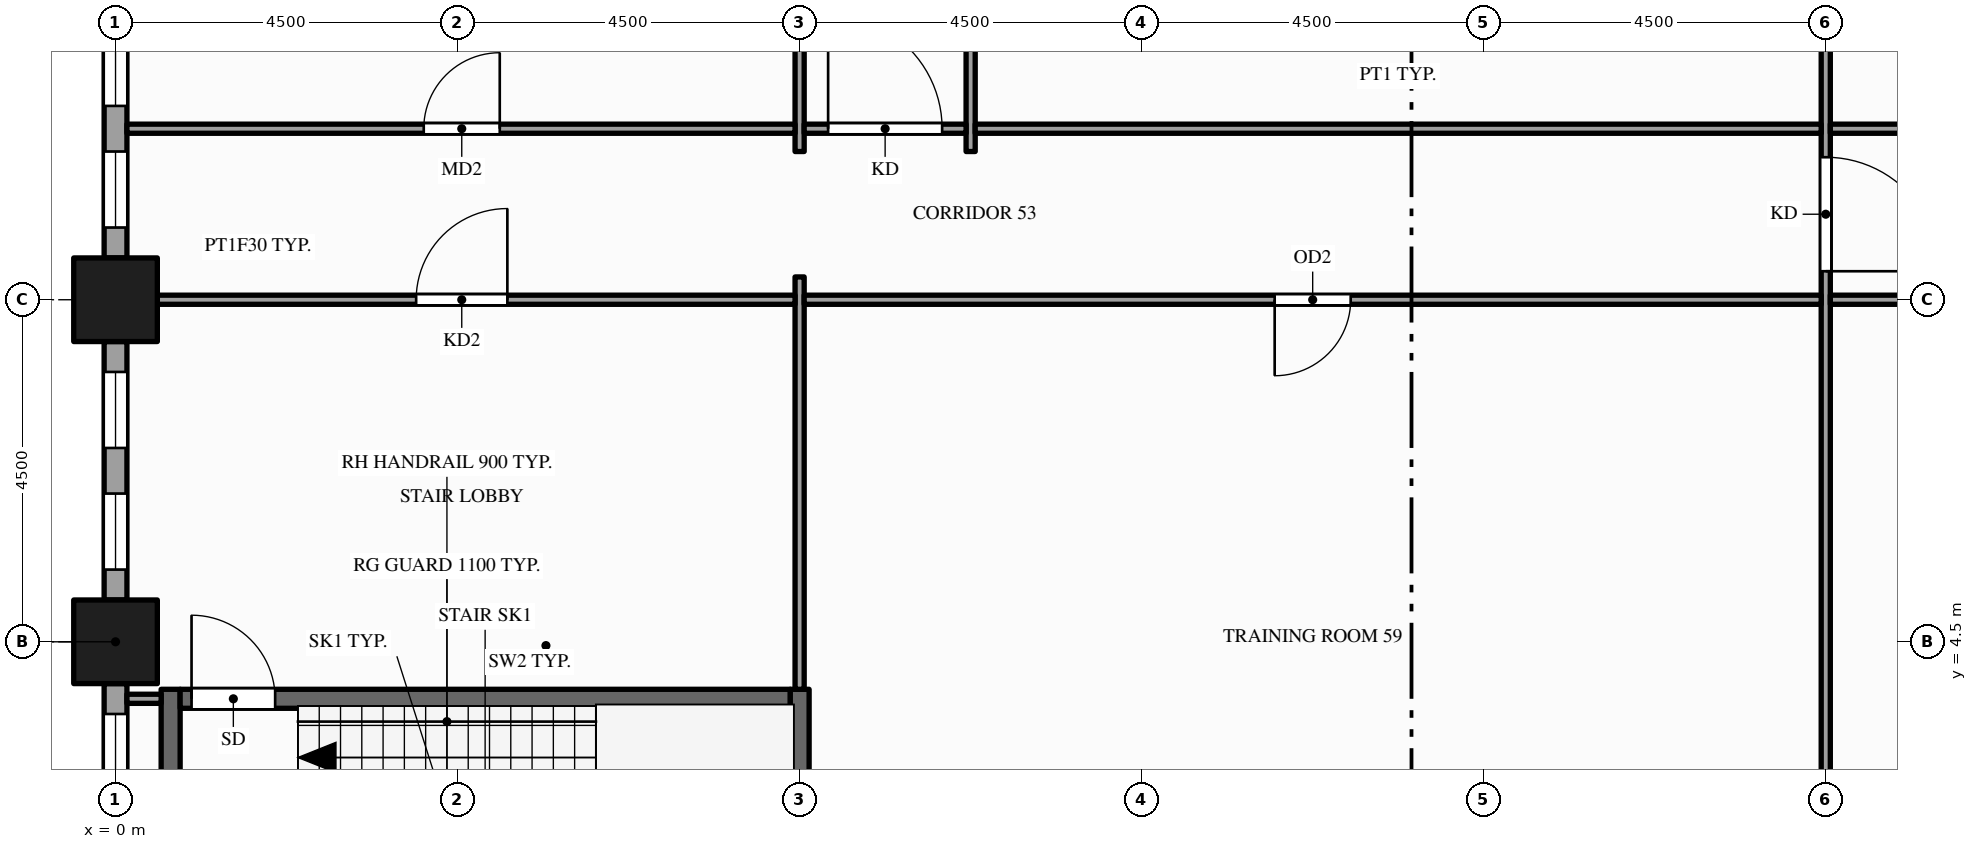
"""IFC4 building model, lengths in metres.
Left out: names, types, materials, properties, quantities, classifications, styles, units other than length and angle.
Written with IfcOpenShell. Run it as: python <this file> out.ifc"""

import sys

from ifc_helpers import new_model, si_unit, direction, frame, frame_2d, origin, origin_2d, place, context, subcontext, project, spatial, rectangle, hollow_rectangle, extrude, element, fill, save


model = new_model("IFC4")
c1 = context("Model", 3, precision=1e-05, world=origin(), true_north=direction((0.0, 1.0)))
c2 = subcontext(c1, "Body", "Model", "MODEL_VIEW")
j1 = project(units=[si_unit("LENGTHUNIT", "METRE"), si_unit("PLANEANGLEUNIT", "RADIAN")], contexts=[c1])
p1 = place(None, origin())
s1 = spatial("IfcSite", under=j1, at=p1, CompositionType="ELEMENT")
p2 = place(p1, origin())
s2 = spatial("IfcBuilding", under=s1, at=p2, CompositionType="ELEMENT")
p3 = place(p2, frame((0.0, 0.0, 14.0)))
s3 = spatial("IfcBuildingStorey", under=s2, at=p3, CompositionType="ELEMENT", Elevation=14.0)
for number, where, z_axis, x_axis in (
    (1, (0.0, 4.5, -0.25), (0.0, 0.0, 1.0), (1.0, 0.0, 0.0)),
    (2, (0.0, 9.0, -0.25), (0.0, 0.0, 1.0), (1.0, 0.0, 0.0)),
):
    element("IfcColumn", number, at=place(p3, frame(where, z_axis=z_axis, x_axis=x_axis)), inside=s3, PredefinedType="COLUMN", context=c2, shape_type="SweptSolid", body=[
        extrude(hollow_rectangle(XDim=1.1, YDim=1.1, WallThickness=0.06, at=origin_2d()), origin(), (0.0, 0.0, 1.0), 5.0),
    ])
p4 = place(p3, frame((0.0, 12.95, 0.0), z_axis=(0.0, 0.0, 1.0), x_axis=(0.0, -1.0, 0.0)))
e3 = element("IfcWall", 3, at=p4, inside=s3, PredefinedType="STANDARD", context=c2, shape_type="SweptSolid", body=[
    extrude(rectangle(XDim=3.4, YDim=0.3, at=frame_2d((1.7, 0.0))), origin(), (0.0, 0.0, 1.0), 4.036),
])
p5 = place(p4, frame((0.4, 0.0, 0.9)))
e4 = element("IfcOpeningElement", 4, at=p5, cuts=e3, PredefinedType="OPENING", context=c2, shape_type="SweptSolid", body=[
    extrude(rectangle(XDim=1.0, YDim=2.75, at=frame_2d((0.5, 1.375))), frame((0.0, 0.16, 0.0), z_axis=(0.0, -1.0, 0.0), x_axis=(1.0, 0.0, 0.0)), (0.0, 0.0, 1.0), 0.32),
])
p6 = place(p4, frame((2.0, 0.0, 0.9)))
e5 = element("IfcOpeningElement", 5, at=p6, cuts=e3, PredefinedType="OPENING", context=c2, shape_type="SweptSolid", body=[
    extrude(rectangle(XDim=1.0, YDim=2.75, at=frame_2d((0.5, 1.375))), frame((0.0, 0.16, 0.0), z_axis=(0.0, -1.0, 0.0), x_axis=(1.0, 0.0, 0.0)), (0.0, 0.0, 1.0), 0.32),
])
p7 = place(p3, frame((0.0, 8.45, 0.0), z_axis=(0.0, 0.0, 1.0), x_axis=(0.0, -1.0, 0.0)))
e6 = element("IfcWall", 6, at=p7, inside=s3, PredefinedType="STANDARD", context=c2, shape_type="SweptSolid", body=[
    extrude(rectangle(XDim=3.4, YDim=0.3, at=frame_2d((1.7, 0.0))), origin(), (0.0, 0.0, 1.0), 4.036),
])
p8 = place(p7, frame((0.4, 0.0, 0.9)))
e7 = element("IfcOpeningElement", 7, at=p8, cuts=e6, PredefinedType="OPENING", context=c2, shape_type="SweptSolid", body=[
    extrude(rectangle(XDim=1.0, YDim=2.75, at=frame_2d((0.5, 1.375))), frame((0.0, 0.16, 0.0), z_axis=(0.0, -1.0, 0.0), x_axis=(1.0, 0.0, 0.0)), (0.0, 0.0, 1.0), 0.32),
])
p9 = place(p7, frame((2.0, 0.0, 0.9)))
e8 = element("IfcOpeningElement", 8, at=p9, cuts=e6, PredefinedType="OPENING", context=c2, shape_type="SweptSolid", body=[
    extrude(rectangle(XDim=1.0, YDim=2.75, at=frame_2d((0.5, 1.375))), frame((0.0, 0.16, 0.0), z_axis=(0.0, -1.0, 0.0), x_axis=(1.0, 0.0, 0.0)), (0.0, 0.0, 1.0), 0.32),
])
p10 = place(p3, frame((0.0, 3.95, 0.0), z_axis=(0.0, 0.0, 1.0), x_axis=(0.0, -1.0, 0.0)))
e9 = element("IfcWall", 9, at=p10, inside=s3, PredefinedType="STANDARD", context=c2, shape_type="SweptSolid", body=[
    extrude(rectangle(XDim=3.4, YDim=0.3, at=frame_2d((1.7, 0.0))), origin(), (0.0, 0.0, 1.0), 4.036),
])
p11 = place(p10, frame((0.4, 0.0, 0.9)))
e10 = element("IfcOpeningElement", 10, at=p11, cuts=e9, PredefinedType="OPENING", context=c2, shape_type="SweptSolid", body=[
    extrude(rectangle(XDim=1.0, YDim=2.75, at=frame_2d((0.5, 1.375))), frame((0.0, 0.16, 0.0), z_axis=(0.0, -1.0, 0.0), x_axis=(1.0, 0.0, 0.0)), (0.0, 0.0, 1.0), 0.32),
])
p12 = place(p10, frame((2.0, 0.0, 0.9)))
e11 = element("IfcOpeningElement", 11, at=p12, cuts=e9, PredefinedType="OPENING", context=c2, shape_type="SweptSolid", body=[
    extrude(rectangle(XDim=1.0, YDim=2.75, at=frame_2d((0.5, 1.375))), frame((0.0, 0.16, 0.0), z_axis=(0.0, -1.0, 0.0), x_axis=(1.0, 0.0, 0.0)), (0.0, 0.0, 1.0), 0.32),
])
p13 = place(p3, frame((0.725, 0.6, 0.0), z_axis=(0.0, 0.0, 1.0), x_axis=(0.0, 1.0, 0.0)))
e12 = element("IfcWall", 12, at=p13, inside=s3, PredefinedType="SHEAR", context=c2, shape_type="SweptSolid", body=[
    extrude(rectangle(XDim=3.275, YDim=0.25, at=frame_2d((1.637, 0.0))), origin(), (0.0, 0.0, 1.0), 4.75),
])
p14 = place(p3, frame((9.0, 0.55, 0.0), z_axis=(0.0, 0.0, 1.0), x_axis=(0.0, 1.0, 0.0)))
e13 = element("IfcWall", 13, at=p14, inside=s3, PredefinedType="SHEAR", context=c2, shape_type="SweptSolid", body=[
    extrude(rectangle(XDim=3.325, YDim=0.25, at=frame_2d((1.663, 0.0))), origin(), (0.0, 0.0, 1.0), 4.75),
])
p15 = place(p3, frame((9.0, 3.875, 0.0), z_axis=(0.0, 0.0, 1.0), x_axis=(0.0, 1.0, 0.0)))
e14 = element("IfcWall", 14, at=p15, inside=s3, PredefinedType="PARTITIONING", context=c2, shape_type="SweptSolid", body=[
    extrude(rectangle(XDim=5.425, YDim=0.12, at=frame_2d((2.712, 0.0))), origin(), (0.0, 0.0, 1.0), 3.759),
])
p16 = place(p3, frame((9.0, 10.95, 0.0), z_axis=(0.0, 0.0, 1.0), x_axis=(0.0, 1.0, 0.0)))
e15 = element("IfcWall", 15, at=p16, inside=s3, PredefinedType="PARTITIONING", context=c2, shape_type="SweptSolid", body=[
    extrude(rectangle(XDim=20.85, YDim=0.12, at=frame_2d((10.425, 0.0))), origin(), (0.0, 0.0, 1.0), 3.5),
])
p17 = place(p16, frame((12.175, 0.0, 0.0)))
e16 = element("IfcOpeningElement", 16, at=p17, cuts=e15, PredefinedType="OPENING", context=c2, shape_type="SweptSolid", body=[
    extrude(rectangle(XDim=1.0, YDim=2.1, at=frame_2d((0.5, 1.05))), frame((0.0, 0.07, 0.0), z_axis=(0.0, -1.0, 0.0), x_axis=(1.0, 0.0, 0.0)), (0.0, 0.0, 1.0), 0.14),
])
p18 = place(p16, frame((14.425, 0.0, 0.0)))
e17 = element("IfcOpeningElement", 17, at=p18, cuts=e15, PredefinedType="OPENING", context=c2, shape_type="SweptSolid", body=[
    extrude(rectangle(XDim=1.0, YDim=2.1, at=frame_2d((0.5, 1.05))), frame((0.0, 0.07, 0.0), z_axis=(0.0, -1.0, 0.0), x_axis=(1.0, 0.0, 0.0)), (0.0, 0.0, 1.0), 0.14),
])
p19 = place(p16, frame((16.675, 0.0, 0.0)))
e18 = element("IfcOpeningElement", 18, at=p19, cuts=e15, PredefinedType="OPENING", context=c2, shape_type="SweptSolid", body=[
    extrude(rectangle(XDim=1.0, YDim=2.1, at=frame_2d((0.5, 1.05))), frame((0.0, 0.07, 0.0), z_axis=(0.0, -1.0, 0.0), x_axis=(1.0, 0.0, 0.0)), (0.0, 0.0, 1.0), 0.14),
])
p20 = place(p16, frame((18.925, 0.0, 0.0)))
e19 = element("IfcOpeningElement", 19, at=p20, cuts=e15, PredefinedType="OPENING", context=c2, shape_type="SweptSolid", body=[
    extrude(rectangle(XDim=1.0, YDim=2.1, at=frame_2d((0.5, 1.05))), frame((0.0, 0.07, 0.0), z_axis=(0.0, -1.0, 0.0), x_axis=(1.0, 0.0, 0.0)), (0.0, 0.0, 1.0), 0.14),
])
p21 = place(p3, frame((11.25, 10.95, 0.0), z_axis=(0.0, 0.0, 1.0), x_axis=(0.0, 1.0, 0.0)))
e20 = element("IfcWall", 20, at=p21, inside=s3, PredefinedType="PARTITIONING", context=c2, shape_type="SweptSolid", body=[
    extrude(rectangle(XDim=20.85, YDim=0.12, at=frame_2d((10.425, 0.0))), origin(), (0.0, 0.0, 1.0), 3.5),
])
p22 = place(p21, frame((5.425, 0.0, 0.0)))
e21 = element("IfcOpeningElement", 21, at=p22, cuts=e20, PredefinedType="OPENING", context=c2, shape_type="SweptSolid", body=[
    extrude(rectangle(XDim=1.0, YDim=2.1, at=frame_2d((0.5, 1.05))), frame((0.0, 0.07, 0.0), z_axis=(0.0, -1.0, 0.0), x_axis=(1.0, 0.0, 0.0)), (0.0, 0.0, 1.0), 0.14),
])
p23 = place(p21, frame((14.425, 0.0, 0.0)))
e22 = element("IfcOpeningElement", 22, at=p23, cuts=e20, PredefinedType="OPENING", context=c2, shape_type="SweptSolid", body=[
    extrude(rectangle(XDim=1.0, YDim=2.1, at=frame_2d((0.5, 1.05))), frame((0.0, 0.07, 0.0), z_axis=(0.0, -1.0, 0.0), x_axis=(1.0, 0.0, 0.0)), (0.0, 0.0, 1.0), 0.14),
])
p24 = place(p21, frame((18.925, 0.0, 0.0)))
e23 = element("IfcOpeningElement", 23, at=p24, cuts=e20, PredefinedType="OPENING", context=c2, shape_type="SweptSolid", body=[
    extrude(rectangle(XDim=1.0, YDim=2.1, at=frame_2d((0.5, 1.05))), frame((0.0, 0.07, 0.0), z_axis=(0.0, -1.0, 0.0), x_axis=(1.0, 0.0, 0.0)), (0.0, 0.0, 1.0), 0.14),
])
p25 = place(p3, frame((22.5, 0.15, 0.0), z_axis=(0.0, 0.0, 1.0), x_axis=(0.0, 1.0, 0.0)))
e24 = element("IfcWall", 24, at=p25, inside=s3, PredefinedType="PARTITIONING", context=c2, shape_type="SweptSolid", body=[
    extrude(rectangle(XDim=35.95, YDim=0.12, at=frame_2d((17.975, 0.0))), origin(), (0.0, 0.0, 1.0), 3.759),
])
p26 = place(p25, frame((9.225, 0.0, 0.0)))
e25 = element("IfcOpeningElement", 25, at=p26, cuts=e24, PredefinedType="OPENING", context=c2, shape_type="SweptSolid", body=[
    extrude(rectangle(XDim=1.5, YDim=2.1, at=frame_2d((0.75, 1.05))), frame((0.0, 0.07, 0.0), z_axis=(0.0, -1.0, 0.0), x_axis=(1.0, 0.0, 0.0)), (0.0, 0.0, 1.0), 0.14),
])
p27 = place(p25, frame((32.7, 0.0, 0.0)))
e26 = element("IfcOpeningElement", 26, at=p27, cuts=e24, PredefinedType="OPENING", context=c2, shape_type="SweptSolid", body=[
    extrude(rectangle(XDim=1.8, YDim=2.1, at=frame_2d((0.9, 1.05))), frame((0.0, 0.07, 0.0), z_axis=(0.0, -1.0, 0.0), x_axis=(1.0, 0.0, 0.0)), (0.0, 0.0, 1.0), 0.14),
])
p28 = place(p3, frame((0.15, 3.75, 0.0), z_axis=(0.0, 0.0, 1.0), x_axis=(1.0, 0.0, 0.0)))
e27 = element("IfcWall", 27, at=p28, inside=s3, PredefinedType="PARTITIONING", context=c2, shape_type="SweptSolid", body=[
    extrude(rectangle(XDim=0.45, YDim=0.12, at=frame_2d((0.225, 0.0))), origin(), (0.0, 0.0, 1.0), 4.036),
])
p29 = place(p3, frame((0.85, 3.75, 0.0), z_axis=(0.0, 0.0, 1.0), x_axis=(1.0, 0.0, 0.0)))
e28 = element("IfcWall", 28, at=p29, inside=s3, PredefinedType="SHEAR", context=c2, shape_type="SweptSolid", body=[
    extrude(rectangle(XDim=8.025, YDim=0.25, at=frame_2d((4.012, 0.0))), origin(), (0.0, 0.0, 1.0), 4.75),
])
p30 = place(p29, frame((0.15, 0.0, 0.0)))
e29 = element("IfcOpeningElement", 29, at=p30, cuts=e28, PredefinedType="OPENING", context=c2, shape_type="SweptSolid", body=[
    extrude(rectangle(XDim=1.1, YDim=2.1, at=frame_2d((0.55, 1.05))), frame((0.0, 0.135, 0.0), z_axis=(0.0, -1.0, 0.0), x_axis=(1.0, 0.0, 0.0)), (0.0, 0.0, 1.0), 0.27),
])
p31 = place(p3, frame((0.15, 9.0, 0.0), z_axis=(0.0, 0.0, 1.0), x_axis=(1.0, 0.0, 0.0)))
e30 = element("IfcWall", 30, at=p31, inside=s3, PredefinedType="PARTITIONING", context=c2, shape_type="SweptSolid", body=[
    extrude(rectangle(XDim=8.79, YDim=0.12, at=frame_2d((4.395, 0.0))), origin(), (0.0, 0.0, 1.0), 3.759),
])
p32 = place(p31, frame((3.805, 0.0, 0.0)))
e31 = element("IfcOpeningElement", 31, at=p32, cuts=e30, PredefinedType="OPENING", context=c2, shape_type="SweptSolid", body=[
    extrude(rectangle(XDim=1.2, YDim=2.1, at=frame_2d((0.6, 1.05))), frame((0.0, 0.07, 0.0), z_axis=(0.0, -1.0, 0.0), x_axis=(1.0, 0.0, 0.0)), (0.0, 0.0, 1.0), 0.14),
])
p33 = place(p3, frame((9.06, 9.0, 0.0), z_axis=(0.0, 0.0, 1.0), x_axis=(1.0, 0.0, 0.0)))
e32 = element("IfcWall", 32, at=p33, inside=s3, PredefinedType="PARTITIONING", context=c2, shape_type="SweptSolid", body=[
    extrude(rectangle(XDim=13.38, YDim=0.12, at=frame_2d((6.69, 0.0))), origin(), (0.0, 0.0, 1.0), 3.759),
])
p34 = place(p33, frame((6.19, 0.0, 0.0)))
e33 = element("IfcOpeningElement", 33, at=p34, cuts=e32, PredefinedType="OPENING", context=c2, shape_type="SweptSolid", body=[
    extrude(rectangle(XDim=1.0, YDim=2.1, at=frame_2d((0.5, 1.05))), frame((0.0, 0.07, 0.0), z_axis=(0.0, -1.0, 0.0), x_axis=(1.0, 0.0, 0.0)), (0.0, 0.0, 1.0), 0.14),
])
p35 = place(p3, frame((22.56, 9.0, 0.0), z_axis=(0.0, 0.0, 1.0), x_axis=(1.0, 0.0, 0.0)))
e34 = element("IfcWall", 34, at=p35, inside=s3, PredefinedType="PARTITIONING", context=c2, shape_type="SweptSolid", body=[
    extrude(rectangle(XDim=4.38, YDim=0.12, at=frame_2d((2.19, 0.0))), origin(), (0.0, 0.0, 1.0), 3.66),
])
p36 = place(p35, frame((1.69, 0.0, 0.0)))
e35 = element("IfcOpeningElement", 35, at=p36, cuts=e34, PredefinedType="OPENING", context=c2, shape_type="SweptSolid", body=[
    extrude(rectangle(XDim=1.0, YDim=2.1, at=frame_2d((0.5, 1.05))), frame((0.0, 0.07, 0.0), z_axis=(0.0, -1.0, 0.0), x_axis=(1.0, 0.0, 0.0)), (0.0, 0.0, 1.0), 0.14),
])
p37 = place(p3, frame((0.15, 11.25, 0.0), z_axis=(0.0, 0.0, 1.0), x_axis=(1.0, 0.0, 0.0)))
e36 = element("IfcWall", 36, at=p37, inside=s3, PredefinedType="PARTITIONING", context=c2, shape_type="SweptSolid", body=[
    extrude(rectangle(XDim=8.79, YDim=0.12, at=frame_2d((4.395, 0.0))), origin(), (0.0, 0.0, 1.0), 3.759),
])
p38 = place(p37, frame((3.905, 0.0, 0.0)))
e37 = element("IfcOpeningElement", 37, at=p38, cuts=e36, PredefinedType="OPENING", context=c2, shape_type="SweptSolid", body=[
    extrude(rectangle(XDim=1.0, YDim=2.1, at=frame_2d((0.5, 1.05))), frame((0.0, 0.07, 0.0), z_axis=(0.0, -1.0, 0.0), x_axis=(1.0, 0.0, 0.0)), (0.0, 0.0, 1.0), 0.14),
])
p39 = place(p3, frame((9.06, 11.25, 0.0), z_axis=(0.0, 0.0, 1.0), x_axis=(1.0, 0.0, 0.0)))
e38 = element("IfcWall", 38, at=p39, inside=s3, PredefinedType="PARTITIONING", context=c2, shape_type="SweptSolid", body=[
    extrude(rectangle(XDim=2.13, YDim=0.12, at=frame_2d((1.065, 0.0))), origin(), (0.0, 0.0, 1.0), 3.759),
])
p40 = place(p39, frame((0.315, 0.0, 0.0)))
e39 = element("IfcOpeningElement", 39, at=p40, cuts=e38, PredefinedType="OPENING", context=c2, shape_type="SweptSolid", body=[
    extrude(rectangle(XDim=1.5, YDim=2.1, at=frame_2d((0.75, 1.05))), frame((0.0, 0.07, 0.0), z_axis=(0.0, -1.0, 0.0), x_axis=(1.0, 0.0, 0.0)), (0.0, 0.0, 1.0), 0.14),
])
p41 = place(p3, frame((11.31, 11.25, 0.0), z_axis=(0.0, 0.0, 1.0), x_axis=(1.0, 0.0, 0.0)))
e40 = element("IfcWall", 40, at=p41, inside=s3, PredefinedType="PARTITIONING", context=c2, shape_type="SweptSolid", body=[
    extrude(rectangle(XDim=11.13, YDim=0.12, at=frame_2d((5.565, 0.0))), origin(), (0.0, 0.0, 1.0), 3.759),
])
p42 = place(p3, frame((22.56, 11.25, 0.0), z_axis=(0.0, 0.0, 1.0), x_axis=(1.0, 0.0, 0.0)))
e41 = element("IfcWall", 41, at=p42, inside=s3, PredefinedType="PARTITIONING", context=c2, shape_type="SweptSolid", body=[
    extrude(rectangle(XDim=4.38, YDim=0.12, at=frame_2d((2.19, 0.0))), origin(), (0.0, 0.0, 1.0), 3.66),
])
p43 = place(p42, frame((1.69, 0.0, 0.0)))
e42 = element("IfcOpeningElement", 42, at=p43, cuts=e41, PredefinedType="OPENING", context=c2, shape_type="SweptSolid", body=[
    extrude(rectangle(XDim=1.0, YDim=2.1, at=frame_2d((0.5, 1.05))), frame((0.0, 0.07, 0.0), z_axis=(0.0, -1.0, 0.0), x_axis=(1.0, 0.0, 0.0)), (0.0, 0.0, 1.0), 0.14),
])
p44 = place(p5, origin())
e43 = element("IfcWindow", 43, at=p44, inside=s3, PartitioningType="SINGLE_PANEL", PredefinedType="WINDOW", context=c2, shape_type="SweptSolid", body=[
    extrude(rectangle(XDim=1.0, YDim=2.75, at=frame_2d((0.5, 1.375))), frame((0.0, 0.03, 0.0), z_axis=(0.0, -1.0, 0.0), x_axis=(1.0, 0.0, 0.0)), (0.0, 0.0, 1.0), 0.06),
])
fill(e4, e43)
p45 = place(p6, origin())
e44 = element("IfcWindow", 44, at=p45, inside=s3, PartitioningType="SINGLE_PANEL", PredefinedType="WINDOW", context=c2, shape_type="SweptSolid", body=[
    extrude(rectangle(XDim=1.0, YDim=2.75, at=frame_2d((0.5, 1.375))), frame((0.0, 0.03, 0.0), z_axis=(0.0, -1.0, 0.0), x_axis=(1.0, 0.0, 0.0)), (0.0, 0.0, 1.0), 0.06),
])
fill(e5, e44)
p46 = place(p8, origin())
e45 = element("IfcWindow", 45, at=p46, inside=s3, PartitioningType="SINGLE_PANEL", PredefinedType="WINDOW", context=c2, shape_type="SweptSolid", body=[
    extrude(rectangle(XDim=1.0, YDim=2.75, at=frame_2d((0.5, 1.375))), frame((0.0, 0.03, 0.0), z_axis=(0.0, -1.0, 0.0), x_axis=(1.0, 0.0, 0.0)), (0.0, 0.0, 1.0), 0.06),
])
fill(e7, e45)
p47 = place(p9, origin())
e46 = element("IfcWindow", 46, at=p47, inside=s3, PartitioningType="SINGLE_PANEL", PredefinedType="WINDOW", context=c2, shape_type="SweptSolid", body=[
    extrude(rectangle(XDim=1.0, YDim=2.75, at=frame_2d((0.5, 1.375))), frame((0.0, 0.03, 0.0), z_axis=(0.0, -1.0, 0.0), x_axis=(1.0, 0.0, 0.0)), (0.0, 0.0, 1.0), 0.06),
])
fill(e8, e46)
p48 = place(p11, origin())
e47 = element("IfcWindow", 47, at=p48, inside=s3, PartitioningType="SINGLE_PANEL", PredefinedType="WINDOW", context=c2, shape_type="SweptSolid", body=[
    extrude(rectangle(XDim=1.0, YDim=2.75, at=frame_2d((0.5, 1.375))), frame((0.0, 0.03, 0.0), z_axis=(0.0, -1.0, 0.0), x_axis=(1.0, 0.0, 0.0)), (0.0, 0.0, 1.0), 0.06),
])
fill(e10, e47)
p49 = place(p30, origin())
e48 = element("IfcDoor", 48, at=p49, inside=s3, OperationType="SINGLE_SWING_LEFT", PredefinedType="DOOR", context=c2, shape_type="SweptSolid", body=[
    extrude(rectangle(XDim=1.1, YDim=2.1, at=frame_2d((0.55, 1.05))), frame((0.0, 0.025, 0.0), z_axis=(0.0, -1.0, 0.0), x_axis=(1.0, 0.0, 0.0)), (0.0, 0.0, 1.0), 0.05),
])
fill(e29, e48)
p50 = place(p32, origin())
e49 = element("IfcDoor", 49, at=p50, inside=s3, OperationType="SINGLE_SWING_RIGHT", PredefinedType="DOOR", context=c2, shape_type="SweptSolid", body=[
    extrude(rectangle(XDim=1.2, YDim=2.1, at=frame_2d((0.6, 1.05))), frame((0.0, 0.025, 0.0), z_axis=(0.0, -1.0, 0.0), x_axis=(1.0, 0.0, 0.0)), (0.0, 0.0, 1.0), 0.05),
])
fill(e31, e49)
p51 = place(p26, origin())
e50 = element("IfcDoor", 50, at=p51, inside=s3, OperationType="SINGLE_SWING_LEFT", PredefinedType="DOOR", context=c2, shape_type="SweptSolid", body=[
    extrude(rectangle(XDim=1.5, YDim=2.1, at=frame_2d((0.75, 1.05))), frame((0.0, 0.025, 0.0), z_axis=(0.0, -1.0, 0.0), x_axis=(1.0, 0.0, 0.0)), (0.0, 0.0, 1.0), 0.05),
])
fill(e25, e50)
p52 = place(p34, origin())
e51 = element("IfcDoor", 51, at=p52, inside=s3, OperationType="SINGLE_SWING_LEFT", PredefinedType="DOOR", context=c2, shape_type="SweptSolid", body=[
    extrude(rectangle(XDim=1.0, YDim=2.1, at=frame_2d((0.5, 1.05))), frame((0.0, 0.025, 0.0), z_axis=(0.0, -1.0, 0.0), x_axis=(1.0, 0.0, 0.0)), (0.0, 0.0, 1.0), 0.05),
])
fill(e33, e51)
p53 = place(p40, origin())
e52 = element("IfcDoor", 52, at=p53, inside=s3, OperationType="SINGLE_SWING_LEFT", PredefinedType="DOOR", context=c2, shape_type="SweptSolid", body=[
    extrude(rectangle(XDim=1.5, YDim=2.1, at=frame_2d((0.75, 1.05))), frame((0.0, 0.025, 0.0), z_axis=(0.0, -1.0, 0.0), x_axis=(1.0, 0.0, 0.0)), (0.0, 0.0, 1.0), 0.05),
])
fill(e39, e52)
p54 = place(p38, origin())
e53 = element("IfcDoor", 53, at=p54, inside=s3, OperationType="SINGLE_SWING_RIGHT", PredefinedType="DOOR", context=c2, shape_type="SweptSolid", body=[
    extrude(rectangle(XDim=1.0, YDim=2.1, at=frame_2d((0.5, 1.05))), frame((0.0, 0.025, 0.0), z_axis=(0.0, -1.0, 0.0), x_axis=(1.0, 0.0, 0.0)), (0.0, 0.0, 1.0), 0.05),
])
fill(e37, e53)
save(model, sys.argv[1])
